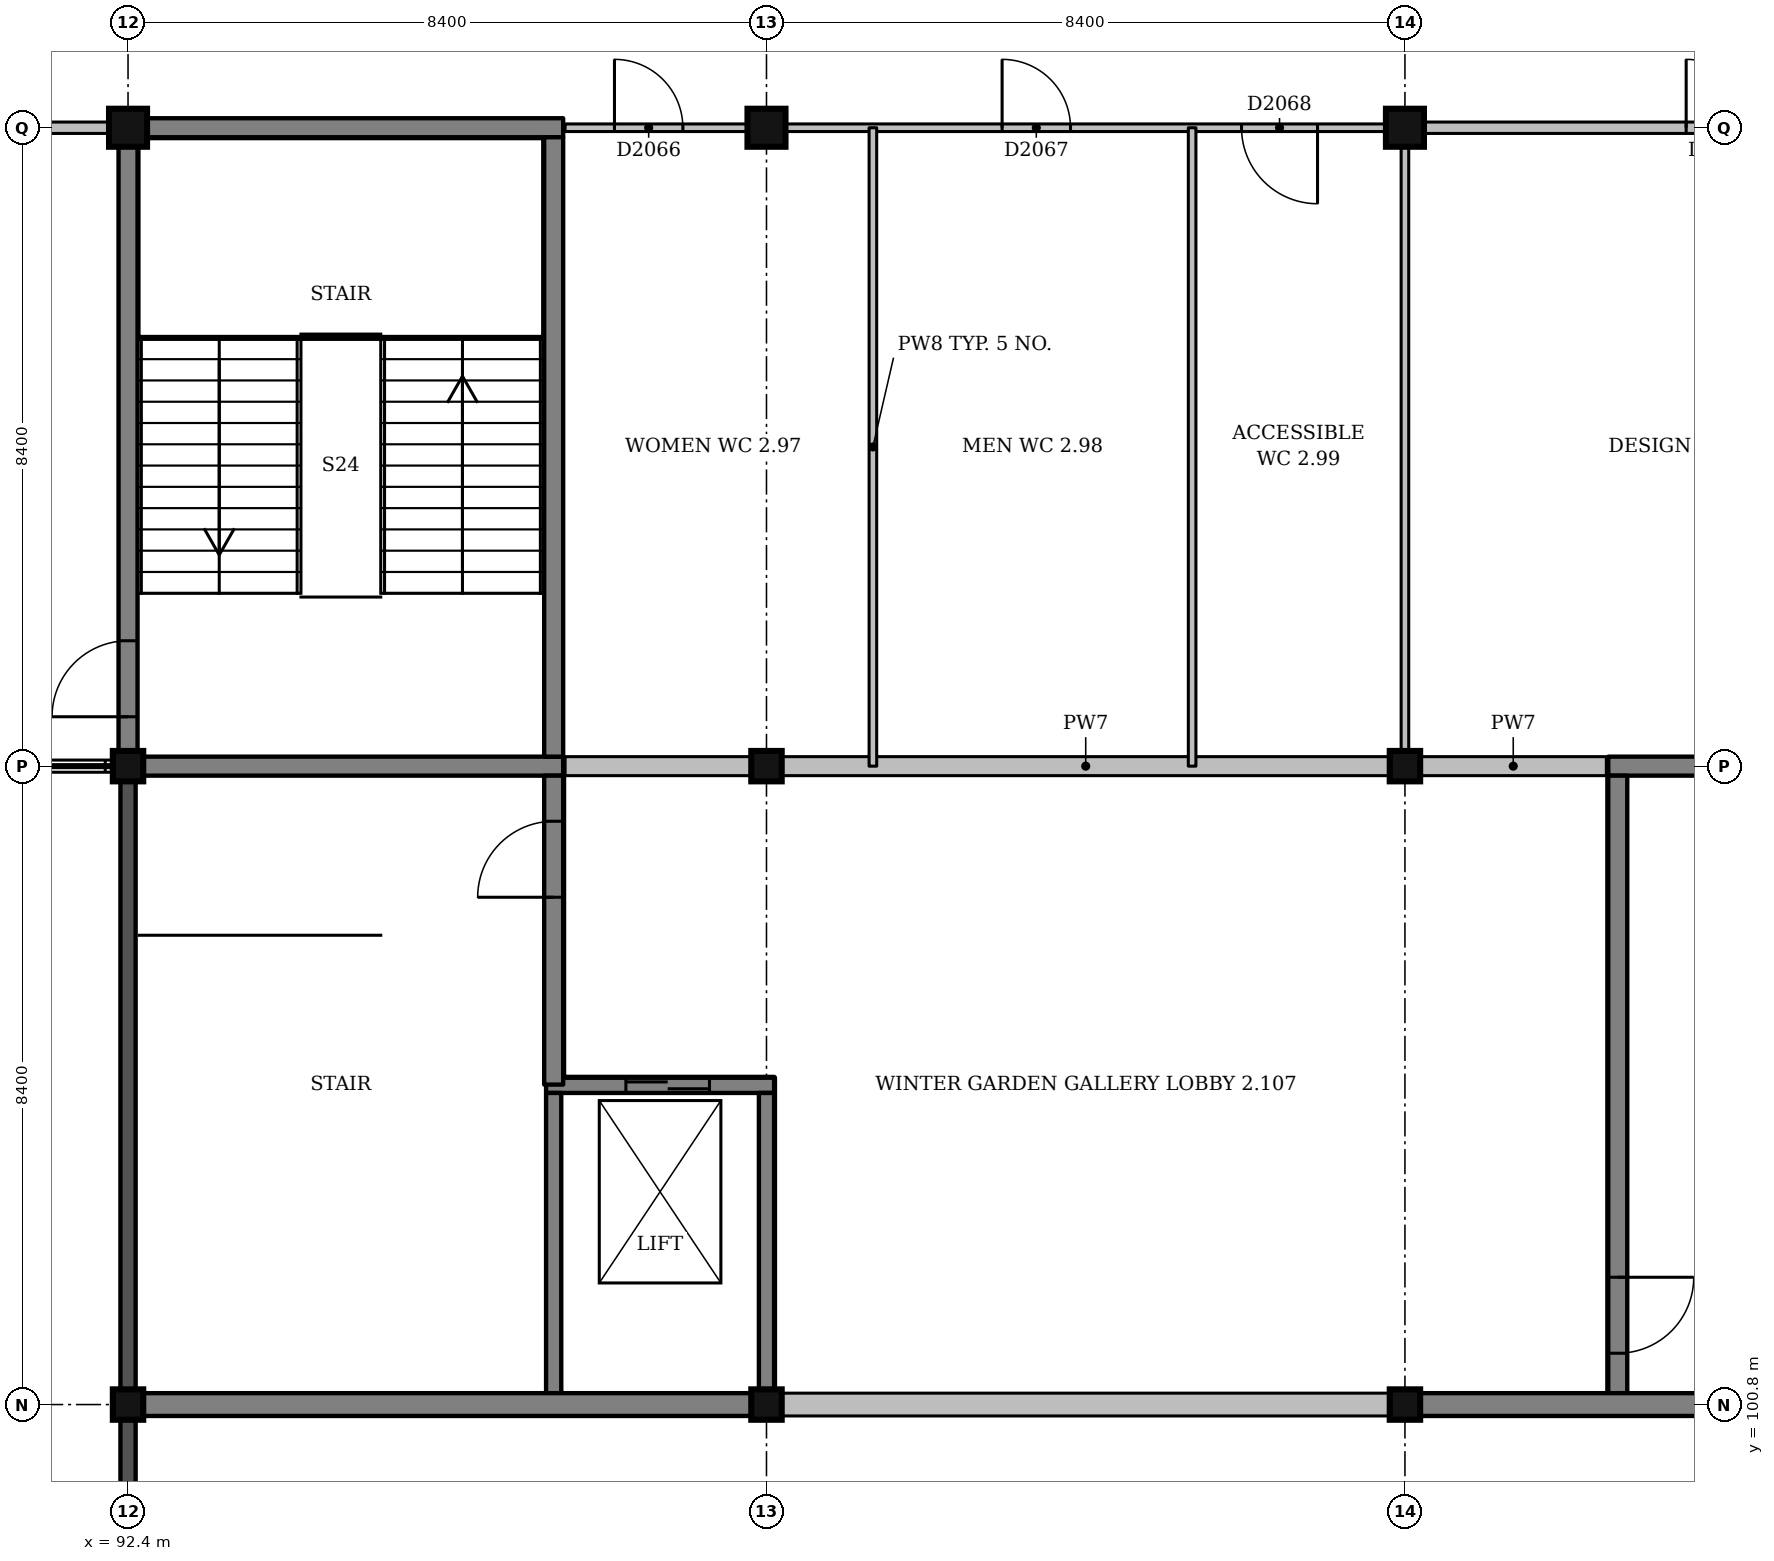
"""IFC4 building model, lengths in metres.
Left out: names, types, materials, properties, quantities, classifications, styles, units other than length and angle.
Written with IfcOpenShell. Run it as: python <this file> out.ifc"""

import sys

from ifc_helpers import new_model, si_unit, direction, frame, frame_2d, origin, origin_2d, place, context, subcontext, project, spatial, rectangle, extrude, element, fill, save


model = new_model("IFC4")
c1 = context("Model", 3, precision=1e-05, world=origin(), true_north=direction((0.0, 1.0)))
c2 = subcontext(c1, "Body", "Model", "MODEL_VIEW")
j1 = project(units=[si_unit("LENGTHUNIT", "METRE"), si_unit("PLANEANGLEUNIT", "RADIAN")], contexts=[c1])
p1 = place(None, origin())
s1 = spatial("IfcSite", under=j1, at=p1, CompositionType="ELEMENT")
p2 = place(p1, origin())
s2 = spatial("IfcBuilding", under=s1, at=p2, CompositionType="ELEMENT")
p3 = place(p2, frame((0.0, 0.0, 9.0)))
s3 = spatial("IfcBuildingStorey", under=s2, at=p3, CompositionType="ELEMENT", Elevation=9.0)
p4 = place(p3, frame((92.4, 109.2, 0.0), z_axis=(0.0, 0.0, 1.0), x_axis=(1.0, 0.0, 0.0)))
e1 = element("IfcColumn", 1, at=p4, inside=s3, PredefinedType="COLUMN", context=c2, shape_type="SweptSolid", body=[
    extrude(rectangle(XDim=0.4, YDim=0.4, at=origin_2d()), origin(), (0.0, 0.0, 1.0), 4.5),
])
p5 = place(p3, frame((92.4, 117.6, -1.5), z_axis=(0.0, 0.0, 1.0), x_axis=(1.0, 0.0, 0.0)))
e2 = element("IfcColumn", 2, at=p5, inside=s3, PredefinedType="COLUMN", context=c2, shape_type="SweptSolid", body=[
    extrude(rectangle(XDim=0.5, YDim=0.5, at=origin_2d()), origin(), (0.0, 0.0, 1.0), 6.0),
])
p6 = place(p3, frame((100.8, 109.2, 0.0), z_axis=(0.0, 0.0, 1.0), x_axis=(1.0, 0.0, 0.0)))
e3 = element("IfcColumn", 3, at=p6, inside=s3, PredefinedType="COLUMN", context=c2, shape_type="SweptSolid", body=[
    extrude(rectangle(XDim=0.4, YDim=0.4, at=origin_2d()), origin(), (0.0, 0.0, 1.0), 4.5),
])
p7 = place(p3, frame((100.8, 117.6, -1.5), z_axis=(0.0, 0.0, 1.0), x_axis=(1.0, 0.0, 0.0)))
e4 = element("IfcColumn", 4, at=p7, inside=s3, PredefinedType="COLUMN", context=c2, shape_type="SweptSolid", body=[
    extrude(rectangle(XDim=0.5, YDim=0.5, at=origin_2d()), origin(), (0.0, 0.0, 1.0), 6.0),
])
p8 = place(p3, frame((109.2, 109.2, 0.0), z_axis=(0.0, 0.0, 1.0), x_axis=(1.0, 0.0, 0.0)))
e5 = element("IfcColumn", 5, at=p8, inside=s3, PredefinedType="COLUMN", context=c2, shape_type="SweptSolid", body=[
    extrude(rectangle(XDim=0.4, YDim=0.4, at=origin_2d()), origin(), (0.0, 0.0, 1.0), 4.5),
])
p9 = place(p3, frame((109.2, 117.6, -1.5), z_axis=(0.0, 0.0, 1.0), x_axis=(1.0, 0.0, 0.0)))
e6 = element("IfcColumn", 6, at=p9, inside=s3, PredefinedType="COLUMN", context=c2, shape_type="SweptSolid", body=[
    extrude(rectangle(XDim=0.5, YDim=0.5, at=origin_2d()), origin(), (0.0, 0.0, 1.0), 6.0),
])
for number, where, z_axis, x_axis in (
    (7, (92.4, 100.8, 0.0), (0.0, 0.0, 1.0), (1.0, 0.0, 0.0)),
    (8, (100.8, 100.8, 0.0), (0.0, 0.0, 1.0), (1.0, 0.0, 0.0)),
    (9, (109.2, 100.8, 0.0), (0.0, 0.0, 1.0), (1.0, 0.0, 0.0)),
):
    element("IfcColumn", number, at=place(p3, frame(where, z_axis=z_axis, x_axis=x_axis)), inside=s3, PredefinedType="COLUMN", context=c2, shape_type="SweptSolid", body=[
        extrude(rectangle(XDim=0.4, YDim=0.4, at=origin_2d()), origin(), (0.0, 0.0, 1.0), 4.5),
    ])
p10 = place(p3, frame((97.9, 105.0, 0.0), z_axis=(0.0, 0.0, 1.0), x_axis=(1.0, 0.0, 0.0)))
e10 = element("IfcWall", 10, at=p10, inside=s3, PredefinedType="SHEAR", context=c2, shape_type="SweptSolid", body=[
    extrude(rectangle(XDim=3.0, YDim=0.2, at=frame_2d((1.5, 0.0))), origin(), (0.0, 0.0, 1.0), 4.5),
])
p11 = place(p10, frame((1.05, 0.0, 0.0)))
e11 = element("IfcOpeningElement", 11, at=p11, cuts=e10, PredefinedType="OPENING", context=c2, shape_type="SweptSolid", body=[
    extrude(rectangle(XDim=1.1, YDim=2.1, at=frame_2d((0.55, 1.05))), frame((0.0, 0.11, 0.0), z_axis=(0.0, -1.0, 0.0), x_axis=(1.0, 0.0, 0.0)), (0.0, 0.0, 1.0), 0.22),
])
p12 = place(p3, frame((98.0, 100.9, 0.0), z_axis=(0.0, 0.0, 1.0), x_axis=(0.0, 1.0, 0.0)))
e12 = element("IfcWall", 12, at=p12, inside=s3, PredefinedType="SHEAR", context=c2, shape_type="SweptSolid", body=[
    extrude(rectangle(XDim=4.0, YDim=0.2, at=frame_2d((2.0, 0.0))), origin(), (0.0, 0.0, 1.0), 4.5),
])
p13 = place(p3, frame((100.8, 101.0, 0.0), z_axis=(0.0, 0.0, 1.0), x_axis=(0.0, 1.0, 0.0)))
e13 = element("IfcWall", 13, at=p13, inside=s3, PredefinedType="SHEAR", context=c2, shape_type="SweptSolid", body=[
    extrude(rectangle(XDim=3.9, YDim=0.2, at=frame_2d((1.95, 0.0))), origin(), (0.0, 0.0, 1.0), 4.5),
])
p14 = place(p3, frame((92.6, 109.2, 0.0), z_axis=(0.0, 0.0, 1.0), x_axis=(1.0, 0.0, 0.0)))
e14 = element("IfcWall", 14, at=p14, inside=s3, PredefinedType="SHEAR", context=c2, shape_type="SweptSolid", body=[
    extrude(rectangle(XDim=5.525, YDim=0.25, at=frame_2d((2.762, 0.0))), origin(), (0.0, 0.0, 1.0), 4.5),
])
p15 = place(p3, frame((92.65, 117.6, 0.0), z_axis=(0.0, 0.0, 1.0), x_axis=(1.0, 0.0, 0.0)))
e15 = element("IfcWall", 15, at=p15, inside=s3, PredefinedType="SHEAR", context=c2, shape_type="SweptSolid", body=[
    extrude(rectangle(XDim=5.475, YDim=0.25, at=frame_2d((2.738, 0.0))), origin(), (0.0, 0.0, 1.0), 4.5),
])
p16 = place(p3, frame((92.4, 109.4, 0.0), z_axis=(0.0, 0.0, 1.0), x_axis=(0.0, 1.0, 0.0)))
e16 = element("IfcWall", 16, at=p16, inside=s3, PredefinedType="SHEAR", context=c2, shape_type="SweptSolid", body=[
    extrude(rectangle(XDim=7.95, YDim=0.25, at=frame_2d((3.975, 0.0))), origin(), (0.0, 0.0, 1.0), 4.5),
])
p17 = place(p16, frame((0.45, 0.0, 0.0)))
e17 = element("IfcOpeningElement", 17, at=p17, cuts=e16, PredefinedType="OPENING", context=c2, shape_type="SweptSolid", body=[
    extrude(rectangle(XDim=1.0, YDim=2.1, at=frame_2d((0.5, 1.05))), frame((0.0, 0.135, 0.0), z_axis=(0.0, -1.0, 0.0), x_axis=(1.0, 0.0, 0.0)), (0.0, 0.0, 1.0), 0.27),
])
p18 = place(p3, frame((98.0, 109.325, 0.0), z_axis=(0.0, 0.0, 1.0), x_axis=(0.0, 1.0, 0.0)))
e18 = element("IfcWall", 18, at=p18, inside=s3, PredefinedType="SHEAR", context=c2, shape_type="SweptSolid", body=[
    extrude(rectangle(XDim=8.15, YDim=0.25, at=frame_2d((4.075, 0.0))), origin(), (0.0, 0.0, 1.0), 4.5),
])
p19 = place(p3, frame((98.0, 105.01, 0.0), z_axis=(0.0, 0.0, 1.0), x_axis=(0.0, 1.0, 0.0)))
e19 = element("IfcWall", 19, at=p19, inside=s3, PredefinedType="SHEAR", context=c2, shape_type="SweptSolid", body=[
    extrude(rectangle(XDim=4.065, YDim=0.25, at=frame_2d((2.032, 0.0))), origin(), (0.0, 0.0, 1.0), 4.5),
])
p20 = place(p19, frame((2.465, 0.0, 0.0)))
e20 = element("IfcOpeningElement", 20, at=p20, cuts=e19, PredefinedType="OPENING", context=c2, shape_type="SweptSolid", body=[
    extrude(rectangle(XDim=1.0, YDim=2.1, at=frame_2d((0.5, 1.05))), frame((0.0, 0.135, 0.0), z_axis=(0.0, -1.0, 0.0), x_axis=(1.0, 0.0, 0.0)), (0.0, 0.0, 1.0), 0.27),
])
p21 = place(p3, frame((111.875, 109.2, 0.0), z_axis=(0.0, 0.0, 1.0), x_axis=(1.0, 0.0, 0.0)))
e21 = element("IfcWall", 21, at=p21, inside=s3, PredefinedType="SHEAR", context=c2, shape_type="SweptSolid", body=[
    extrude(rectangle(XDim=5.525, YDim=0.25, at=frame_2d((2.762, 0.0))), origin(), (0.0, 0.0, 1.0), 4.5),
])
p22 = place(p3, frame((112.0, 100.925, 0.0), z_axis=(0.0, 0.0, 1.0), x_axis=(0.0, 1.0, 0.0)))
e22 = element("IfcWall", 22, at=p22, inside=s3, PredefinedType="SHEAR", context=c2, shape_type="SweptSolid", body=[
    extrude(rectangle(XDim=8.15, YDim=0.25, at=frame_2d((4.075, 0.0))), origin(), (0.0, 0.0, 1.0), 4.5),
])
p23 = place(p22, frame((0.55, 0.0, 0.0)))
e23 = element("IfcOpeningElement", 23, at=p23, cuts=e22, PredefinedType="OPENING", context=c2, shape_type="SweptSolid", body=[
    extrude(rectangle(XDim=1.0, YDim=2.1, at=frame_2d((0.5, 1.05))), frame((0.0, 0.135, 0.0), z_axis=(0.0, -1.0, 0.0), x_axis=(1.0, 0.0, 0.0)), (0.0, 0.0, 1.0), 0.27),
])
p24 = place(p3, frame((92.4, 109.0, 0.0), z_axis=(0.0, 0.0, 1.0), x_axis=(0.0, -1.0, 0.0)))
e24 = element("IfcWall", 24, at=p24, inside=s3, PredefinedType="SOLIDWALL", context=c2, shape_type="SweptSolid", body=[
    extrude(rectangle(XDim=8.0, YDim=0.2, at=frame_2d((4.0, 0.0))), origin(), (0.0, 0.0, 1.0), 4.5),
])
for number, where, z_axis, x_axis in (
    (25, (92.6, 100.8, 0.0), (0.0, 0.0, 1.0), (1.0, 0.0, 0.0)),
    (26, (101.0, 100.8, 0.0), (0.0, 0.0, 1.0), (1.0, 0.0, 0.0)),
    (27, (109.4, 100.8, 0.0), (0.0, 0.0, 1.0), (1.0, 0.0, 0.0)),
):
    element("IfcWall", number, at=place(p3, frame(where, z_axis=z_axis, x_axis=x_axis)), inside=s3, PredefinedType="SOLIDWALL", context=c2, shape_type="SweptSolid", body=[
        extrude(rectangle(XDim=8.0, YDim=0.3, at=frame_2d((4.0, 0.0))), origin(), (0.0, 0.0, 1.0), 4.5),
    ])
p25 = place(p3, frame((92.4, 100.6, 0.0), z_axis=(0.0, 0.0, 1.0), x_axis=(0.0, -1.0, 0.0)))
e28 = element("IfcWall", 28, at=p25, inside=s3, PredefinedType="SOLIDWALL", context=c2, shape_type="SweptSolid", body=[
    extrude(rectangle(XDim=41.6, YDim=0.2, at=frame_2d((20.8, 0.0))), origin(), (0.0, 0.0, 1.0), 4.5),
])
p26 = place(p3, frame((98.15, 109.2, 0.0), z_axis=(0.0, 0.0, 1.0), x_axis=(1.0, 0.0, 0.0)))
e29 = element("IfcWall", 29, at=p26, inside=s3, PredefinedType="SOLIDWALL", context=c2, shape_type="SweptSolid", body=[
    extrude(rectangle(XDim=2.45, YDim=0.25, at=frame_2d((1.225, 0.0))), origin(), (0.0, 0.0, 1.0), 3.45),
])
p27 = place(p3, frame((101.0, 109.2, 0.0), z_axis=(0.0, 0.0, 1.0), x_axis=(1.0, 0.0, 0.0)))
e30 = element("IfcWall", 30, at=p27, inside=s3, PredefinedType="SOLIDWALL", context=c2, shape_type="SweptSolid", body=[
    extrude(rectangle(XDim=8.0, YDim=0.25, at=frame_2d((4.0, 0.0))), origin(), (0.0, 0.0, 1.0), 3.45),
])
p28 = place(p3, frame((109.4, 109.2, 0.0), z_axis=(0.0, 0.0, 1.0), x_axis=(1.0, 0.0, 0.0)))
e31 = element("IfcWall", 31, at=p28, inside=s3, PredefinedType="SOLIDWALL", context=c2, shape_type="SweptSolid", body=[
    extrude(rectangle(XDim=2.45, YDim=0.25, at=frame_2d((1.225, 0.0))), origin(), (0.0, 0.0, 1.0), 3.45),
])
p29 = place(p3, frame((84.2, 117.6, 0.0), z_axis=(0.0, 0.0, 1.0), x_axis=(1.0, 0.0, 0.0)))
e32 = element("IfcWall", 32, at=p29, inside=s3, PredefinedType="PARTITIONING", context=c2, shape_type="SweptSolid", body=[
    extrude(rectangle(XDim=7.95, YDim=0.15, at=frame_2d((3.975, 0.0))), origin(), (0.0, 0.0, 1.0), 3.4),
])
p30 = place(p29, frame((3.45, 0.0, 0.0)))
e33 = element("IfcOpeningElement", 33, at=p30, cuts=e32, PredefinedType="OPENING", context=c2, shape_type="SweptSolid", body=[
    extrude(rectangle(XDim=0.9, YDim=2.1, at=frame_2d((0.45, 1.05))), frame((0.0, 0.085, 0.0), z_axis=(0.0, -1.0, 0.0), x_axis=(1.0, 0.0, 0.0)), (0.0, 0.0, 1.0), 0.17),
])
p31 = place(p3, frame((109.45, 117.6, 0.0), z_axis=(0.0, 0.0, 1.0), x_axis=(1.0, 0.0, 0.0)))
e34 = element("IfcWall", 34, at=p31, inside=s3, PredefinedType="PARTITIONING", context=c2, shape_type="SweptSolid", body=[
    extrude(rectangle(XDim=7.95, YDim=0.15, at=frame_2d((3.975, 0.0))), origin(), (0.0, 0.0, 1.0), 3.5),
])
p32 = place(p31, frame((3.45, 0.0, 0.0)))
e35 = element("IfcOpeningElement", 35, at=p32, cuts=e34, PredefinedType="OPENING", context=c2, shape_type="SweptSolid", body=[
    extrude(rectangle(XDim=0.9, YDim=2.1, at=frame_2d((0.45, 1.05))), frame((0.0, 0.085, 0.0), z_axis=(0.0, -1.0, 0.0), x_axis=(1.0, 0.0, 0.0)), (0.0, 0.0, 1.0), 0.17),
])
p33 = place(p3, frame((98.15, 117.6, 0.0), z_axis=(0.0, 0.0, 1.0), x_axis=(1.0, 0.0, 0.0)))
e36 = element("IfcWall", 36, at=p33, inside=s3, PredefinedType="PARTITIONING", context=c2, shape_type="SweptSolid", body=[
    extrude(rectangle(XDim=2.4, YDim=0.1, at=frame_2d((1.2, 0.0))), origin(), (0.0, 0.0, 1.0), 3.6),
])
p34 = place(p33, frame((0.65, 0.0, 0.0)))
e37 = element("IfcOpeningElement", 37, at=p34, cuts=e36, PredefinedType="OPENING", context=c2, shape_type="SweptSolid", body=[
    extrude(rectangle(XDim=0.9, YDim=2.1, at=frame_2d((0.45, 1.05))), frame((0.0, 0.06, 0.0), z_axis=(0.0, -1.0, 0.0), x_axis=(1.0, 0.0, 0.0)), (0.0, 0.0, 1.0), 0.12),
])
p35 = place(p3, frame((101.05, 117.6, 0.0), z_axis=(0.0, 0.0, 1.0), x_axis=(1.0, 0.0, 0.0)))
e38 = element("IfcWall", 38, at=p35, inside=s3, PredefinedType="PARTITIONING", context=c2, shape_type="SweptSolid", body=[
    extrude(rectangle(XDim=7.9, YDim=0.1, at=frame_2d((3.95, 0.0))), origin(), (0.0, 0.0, 1.0), 3.5),
])
p36 = place(p35, frame((2.85, 0.0, 0.0)))
e39 = element("IfcOpeningElement", 39, at=p36, cuts=e38, PredefinedType="OPENING", context=c2, shape_type="SweptSolid", body=[
    extrude(rectangle(XDim=0.9, YDim=2.1, at=frame_2d((0.45, 1.05))), frame((0.0, 0.06, 0.0), z_axis=(0.0, -1.0, 0.0), x_axis=(1.0, 0.0, 0.0)), (0.0, 0.0, 1.0), 0.12),
])
p37 = place(p35, frame((6.0, 0.0, 0.0)))
e40 = element("IfcOpeningElement", 40, at=p37, cuts=e38, PredefinedType="OPENING", context=c2, shape_type="SweptSolid", body=[
    extrude(rectangle(XDim=1.0, YDim=2.1, at=frame_2d((0.5, 1.05))), frame((0.0, 0.06, 0.0), z_axis=(0.0, -1.0, 0.0), x_axis=(1.0, 0.0, 0.0)), (0.0, 0.0, 1.0), 0.12),
])
for number, where, z_axis, x_axis in (
    (41, (102.2, 109.2, 0.0), (0.0, 0.0, 1.0), (0.0, 1.0, 0.0)),
    (42, (106.4, 109.2, 0.0), (0.0, 0.0, 1.0), (0.0, 1.0, 0.0)),
):
    element("IfcWall", number, at=place(p3, frame(where, z_axis=z_axis, x_axis=x_axis)), inside=s3, PredefinedType="PARTITIONING", context=c2, shape_type="SweptSolid", body=[
        extrude(rectangle(XDim=8.4, YDim=0.1, at=frame_2d((4.2, 0.0))), origin(), (0.0, 0.0, 1.0), 3.45),
    ])
p38 = place(p3, frame((109.2, 109.4, 0.0), z_axis=(0.0, 0.0, 1.0), x_axis=(0.0, 1.0, 0.0)))
e43 = element("IfcWall", 43, at=p38, inside=s3, PredefinedType="PARTITIONING", context=c2, shape_type="SweptSolid", body=[
    extrude(rectangle(XDim=7.95, YDim=0.1, at=frame_2d((3.975, 0.0))), origin(), (0.0, 0.0, 1.0), 4.15),
])
p39 = place(p34, origin())
e44 = element("IfcDoor", 44, at=p39, inside=s3, OperationType="SINGLE_SWING_LEFT", PredefinedType="DOOR", context=c2, shape_type="SweptSolid", body=[
    extrude(rectangle(XDim=0.9, YDim=2.1, at=frame_2d((0.45, 1.05))), frame((0.0, 0.025, 0.0), z_axis=(0.0, -1.0, 0.0), x_axis=(1.0, 0.0, 0.0)), (0.0, 0.0, 1.0), 0.05),
])
fill(e37, e44)
p40 = place(p36, origin())
e45 = element("IfcDoor", 45, at=p40, inside=s3, OperationType="SINGLE_SWING_LEFT", PredefinedType="DOOR", context=c2, shape_type="SweptSolid", body=[
    extrude(rectangle(XDim=0.9, YDim=2.1, at=frame_2d((0.45, 1.05))), frame((0.0, 0.025, 0.0), z_axis=(0.0, -1.0, 0.0), x_axis=(1.0, 0.0, 0.0)), (0.0, 0.0, 1.0), 0.05),
])
fill(e39, e45)
p41 = place(p37, origin())
e46 = element("IfcDoor", 46, at=p41, inside=s3, OperationType="SINGLE_SWING_RIGHT", PredefinedType="DOOR", context=c2, shape_type="SweptSolid", body=[
    extrude(rectangle(XDim=1.0, YDim=2.1, at=frame_2d((0.5, 1.05))), frame((0.0, 0.025, 0.0), z_axis=(0.0, -1.0, 0.0), x_axis=(1.0, 0.0, 0.0)), (0.0, 0.0, 1.0), 0.05),
])
fill(e40, e46)
p42 = place(p32, origin())
e47 = element("IfcDoor", 47, at=p42, inside=s3, OperationType="SINGLE_SWING_LEFT", PredefinedType="DOOR", context=c2, shape_type="SweptSolid", body=[
    extrude(rectangle(XDim=0.9, YDim=2.1, at=frame_2d((0.45, 1.05))), frame((0.0, 0.025, 0.0), z_axis=(0.0, -1.0, 0.0), x_axis=(1.0, 0.0, 0.0)), (0.0, 0.0, 1.0), 0.05),
])
fill(e35, e47)
p43 = place(p17, origin())
e48 = element("IfcDoor", 48, at=p43, inside=s3, OperationType="SINGLE_SWING_LEFT", PredefinedType="DOOR", context=c2, shape_type="SweptSolid", body=[
    extrude(rectangle(XDim=1.0, YDim=2.1, at=frame_2d((0.5, 1.05))), frame((0.0, 0.025, 0.0), z_axis=(0.0, -1.0, 0.0), x_axis=(1.0, 0.0, 0.0)), (0.0, 0.0, 1.0), 0.05),
])
fill(e17, e48)
p44 = place(p20, origin())
e49 = element("IfcDoor", 49, at=p44, inside=s3, OperationType="SINGLE_SWING_LEFT", PredefinedType="DOOR", context=c2, shape_type="SweptSolid", body=[
    extrude(rectangle(XDim=1.0, YDim=2.1, at=frame_2d((0.5, 1.05))), frame((0.0, 0.025, 0.0), z_axis=(0.0, -1.0, 0.0), x_axis=(1.0, 0.0, 0.0)), (0.0, 0.0, 1.0), 0.05),
])
fill(e20, e49)
p45 = place(p23, origin())
e50 = element("IfcDoor", 50, at=p45, inside=s3, OperationType="SINGLE_SWING_RIGHT", PredefinedType="DOOR", context=c2, shape_type="SweptSolid", body=[
    extrude(rectangle(XDim=1.0, YDim=2.1, at=frame_2d((0.5, 1.05))), frame((0.0, 0.025, 0.0), z_axis=(0.0, -1.0, 0.0), x_axis=(1.0, 0.0, 0.0)), (0.0, 0.0, 1.0), 0.05),
])
fill(e23, e50)
p46 = place(p11, origin())
e51 = element("IfcDoor", 51, at=p46, inside=s3, OperationType="SLIDING_TO_LEFT", PredefinedType="DOOR", context=c2, shape_type="SweptSolid", body=[
    extrude(rectangle(XDim=1.1, YDim=2.1, at=frame_2d((0.55, 1.05))), frame((0.0, 0.025, 0.0), z_axis=(0.0, -1.0, 0.0), x_axis=(1.0, 0.0, 0.0)), (0.0, 0.0, 1.0), 0.05),
])
fill(e11, e51)
save(model, sys.argv[1])
